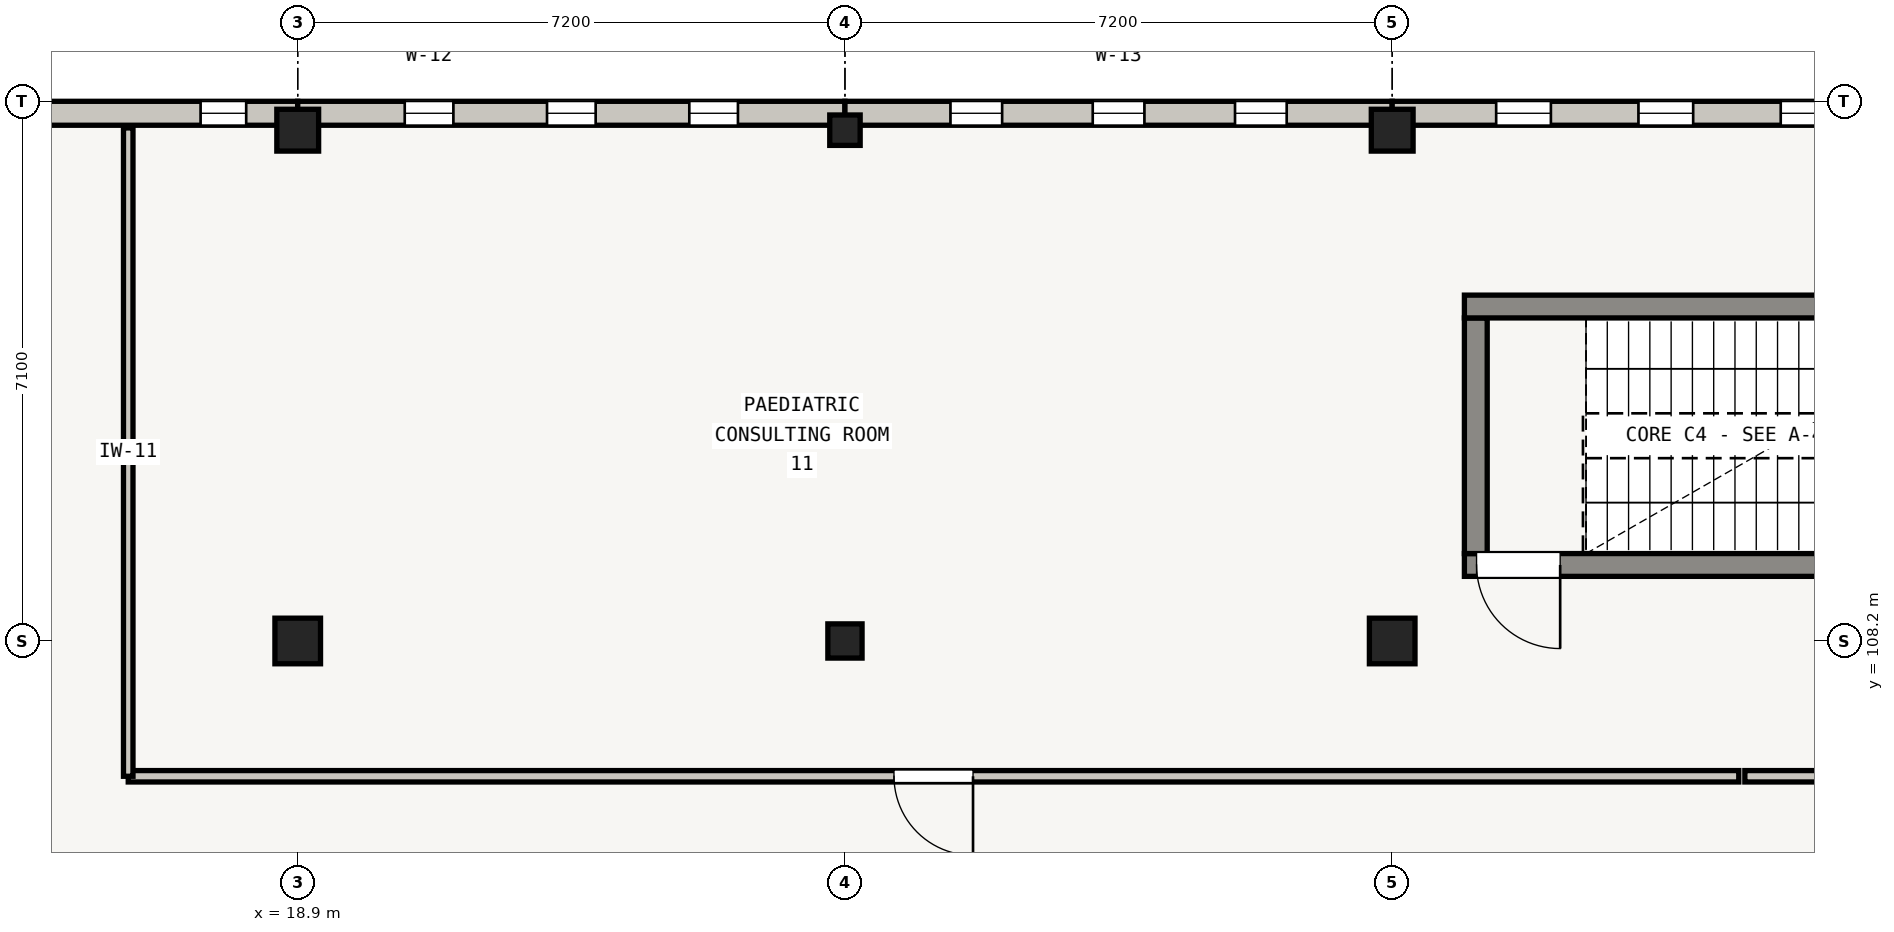
"""IFC4 building model, lengths in metres.
Left out: names, types, materials, properties, quantities, classifications, styles, units other than length and angle.
Written with IfcOpenShell. Run it as: python <this file> out.ifc"""

import sys

from ifc_helpers import new_model, si_unit, direction, frame, frame_2d, origin, origin_2d, place, context, subcontext, project, spatial, rectangle, extrude, element, fill, save


model = new_model("IFC4")
c1 = context("Model", 3, precision=1e-05, world=origin(), true_north=direction((0.0, 1.0)))
c2 = subcontext(c1, "Body", "Model", "MODEL_VIEW")
j1 = project(units=[si_unit("LENGTHUNIT", "METRE"), si_unit("PLANEANGLEUNIT", "RADIAN")], contexts=[c1])
p1 = place(None, origin())
s1 = spatial("IfcSite", under=j1, at=p1, CompositionType="ELEMENT")
p2 = place(p1, origin())
s2 = spatial("IfcBuilding", under=s1, at=p2, CompositionType="ELEMENT")
p3 = place(p2, frame((0.0, 0.0, 4.5)))
s3 = spatial("IfcBuildingStorey", under=s2, at=p3, CompositionType="ELEMENT", Elevation=4.5)
p4 = place(p3, frame((18.9, 108.2, 0.0), z_axis=(0.0, 0.0, 1.0), x_axis=(1.0, 0.0, 0.0)))
e1 = element("IfcColumn", 1, at=p4, inside=s3, PredefinedType="COLUMN", context=c2, shape_type="SweptSolid", body=[
    extrude(rectangle(XDim=0.6, YDim=0.6, at=origin_2d()), origin(), (0.0, 0.0, 1.0), 3.935),
])
p5 = place(p3, frame((18.9, 114.92, 0.0), z_axis=(0.0, 0.0, 1.0), x_axis=(1.0, 0.0, 0.0)))
e2 = element("IfcColumn", 2, at=p5, inside=s3, PredefinedType="COLUMN", context=c2, shape_type="SweptSolid", body=[
    extrude(rectangle(XDim=0.55, YDim=0.55, at=origin_2d()), origin(), (0.0, 0.0, 1.0), 3.935),
])
p6 = place(p3, frame((26.1, 108.2, 0.0), z_axis=(0.0, 0.0, 1.0), x_axis=(1.0, 0.0, 0.0)))
e3 = element("IfcColumn", 3, at=p6, inside=s3, PredefinedType="COLUMN", context=c2, shape_type="SweptSolid", body=[
    extrude(rectangle(XDim=0.45, YDim=0.45, at=origin_2d()), origin(), (0.0, 0.0, 1.0), 3.935),
])
p7 = place(p3, frame((26.1, 114.92, 0.0), z_axis=(0.0, 0.0, 1.0), x_axis=(1.0, 0.0, 0.0)))
e4 = element("IfcColumn", 4, at=p7, inside=s3, PredefinedType="COLUMN", context=c2, shape_type="SweptSolid", body=[
    extrude(rectangle(XDim=0.4, YDim=0.4, at=origin_2d()), origin(), (0.0, 0.0, 1.0), 3.935),
])
p8 = place(p3, frame((33.3, 108.2, 0.0), z_axis=(0.0, 0.0, 1.0), x_axis=(1.0, 0.0, 0.0)))
e5 = element("IfcColumn", 5, at=p8, inside=s3, PredefinedType="COLUMN", context=c2, shape_type="SweptSolid", body=[
    extrude(rectangle(XDim=0.6, YDim=0.6, at=origin_2d()), origin(), (0.0, 0.0, 1.0), 3.935),
])
p9 = place(p3, frame((33.3, 114.92, 0.0), z_axis=(0.0, 0.0, 1.0), x_axis=(1.0, 0.0, 0.0)))
e6 = element("IfcColumn", 6, at=p9, inside=s3, PredefinedType="COLUMN", context=c2, shape_type="SweptSolid", body=[
    extrude(rectangle(XDim=0.55, YDim=0.55, at=origin_2d()), origin(), (0.0, 0.0, 1.0), 3.935),
])
p10 = place(p3, frame((11.7, 115.143, 0.0), z_axis=(0.0, 0.0, 1.0), x_axis=(1.0, 0.0, 0.0)))
e7 = element("IfcWall", 7, at=p10, inside=s3, PredefinedType="SOLIDWALL", context=c2, shape_type="SweptSolid", body=[
    extrude(rectangle(XDim=7.2, YDim=0.315, at=frame_2d((3.6, 0.0))), origin(), (0.0, 0.0, 1.0), 3.3),
])
p11 = place(p10, frame((0.678, 0.0, 0.55)))
e8 = element("IfcOpeningElement", 8, at=p11, cuts=e7, PredefinedType="OPENING", context=c2, shape_type="SweptSolid", body=[
    extrude(rectangle(XDim=0.6, YDim=2.28, at=frame_2d((0.3, 1.14))), frame((0.0, 0.157, 0.0), z_axis=(0.0, -1.0, 0.0), x_axis=(1.0, 0.0, 0.0)), (0.0, 0.0, 1.0), 0.315),
])
p12 = place(p10, frame((3.3, 0.0, 0.55)))
e9 = element("IfcOpeningElement", 9, at=p12, cuts=e7, PredefinedType="OPENING", context=c2, shape_type="SweptSolid", body=[
    extrude(rectangle(XDim=0.6, YDim=2.28, at=frame_2d((0.3, 1.14))), frame((0.0, 0.157, 0.0), z_axis=(0.0, -1.0, 0.0), x_axis=(1.0, 0.0, 0.0)), (0.0, 0.0, 1.0), 0.315),
])
p13 = place(p10, frame((5.922, 0.0, 0.55)))
e10 = element("IfcOpeningElement", 10, at=p13, cuts=e7, PredefinedType="OPENING", context=c2, shape_type="SweptSolid", body=[
    extrude(rectangle(XDim=0.6, YDim=2.28, at=frame_2d((0.3, 1.14))), frame((0.0, 0.157, 0.0), z_axis=(0.0, -1.0, 0.0), x_axis=(1.0, 0.0, 0.0)), (0.0, 0.0, 1.0), 0.315),
])
p14 = place(p3, frame((18.9, 115.143, 0.0), z_axis=(0.0, 0.0, 1.0), x_axis=(1.0, 0.0, 0.0)))
e11 = element("IfcWall", 11, at=p14, inside=s3, PredefinedType="SOLIDWALL", context=c2, shape_type="SweptSolid", body=[
    extrude(rectangle(XDim=7.2, YDim=0.315, at=frame_2d((3.6, 0.0))), origin(), (0.0, 0.0, 1.0), 3.32),
])
p15 = place(p14, frame((1.408, 0.0, 0.55)))
e12 = element("IfcOpeningElement", 12, at=p15, cuts=e11, PredefinedType="OPENING", context=c2, shape_type="SweptSolid", body=[
    extrude(rectangle(XDim=0.64, YDim=2.28, at=frame_2d((0.32, 1.14))), frame((0.0, 0.157, 0.0), z_axis=(0.0, -1.0, 0.0), x_axis=(1.0, 0.0, 0.0)), (0.0, 0.0, 1.0), 0.315),
])
p16 = place(p14, frame((3.28, 0.0, 0.55)))
e13 = element("IfcOpeningElement", 13, at=p16, cuts=e11, PredefinedType="OPENING", context=c2, shape_type="SweptSolid", body=[
    extrude(rectangle(XDim=0.64, YDim=2.28, at=frame_2d((0.32, 1.14))), frame((0.0, 0.157, 0.0), z_axis=(0.0, -1.0, 0.0), x_axis=(1.0, 0.0, 0.0)), (0.0, 0.0, 1.0), 0.315),
])
p17 = place(p14, frame((5.152, 0.0, 0.55)))
e14 = element("IfcOpeningElement", 14, at=p17, cuts=e11, PredefinedType="OPENING", context=c2, shape_type="SweptSolid", body=[
    extrude(rectangle(XDim=0.64, YDim=2.28, at=frame_2d((0.32, 1.14))), frame((0.0, 0.157, 0.0), z_axis=(0.0, -1.0, 0.0), x_axis=(1.0, 0.0, 0.0)), (0.0, 0.0, 1.0), 0.315),
])
p18 = place(p3, frame((26.1, 115.143, 0.0), z_axis=(0.0, 0.0, 1.0), x_axis=(1.0, 0.0, 0.0)))
e15 = element("IfcWall", 15, at=p18, inside=s3, PredefinedType="SOLIDWALL", context=c2, shape_type="SweptSolid", body=[
    extrude(rectangle(XDim=7.2, YDim=0.315, at=frame_2d((3.6, 0.0))), origin(), (0.0, 0.0, 1.0), 3.3),
])
p19 = place(p18, frame((1.388, 0.0, 0.55)))
e16 = element("IfcOpeningElement", 16, at=p19, cuts=e15, PredefinedType="OPENING", context=c2, shape_type="SweptSolid", body=[
    extrude(rectangle(XDim=0.68, YDim=2.22, at=frame_2d((0.34, 1.11))), frame((0.0, 0.157, 0.0), z_axis=(0.0, -1.0, 0.0), x_axis=(1.0, 0.0, 0.0)), (0.0, 0.0, 1.0), 0.315),
])
p20 = place(p18, frame((3.26, 0.0, 0.55)))
e17 = element("IfcOpeningElement", 17, at=p20, cuts=e15, PredefinedType="OPENING", context=c2, shape_type="SweptSolid", body=[
    extrude(rectangle(XDim=0.68, YDim=2.22, at=frame_2d((0.34, 1.11))), frame((0.0, 0.157, 0.0), z_axis=(0.0, -1.0, 0.0), x_axis=(1.0, 0.0, 0.0)), (0.0, 0.0, 1.0), 0.315),
])
p21 = place(p18, frame((5.132, 0.0, 0.55)))
e18 = element("IfcOpeningElement", 18, at=p21, cuts=e15, PredefinedType="OPENING", context=c2, shape_type="SweptSolid", body=[
    extrude(rectangle(XDim=0.68, YDim=2.22, at=frame_2d((0.34, 1.11))), frame((0.0, 0.157, 0.0), z_axis=(0.0, -1.0, 0.0), x_axis=(1.0, 0.0, 0.0)), (0.0, 0.0, 1.0), 0.315),
])
p22 = place(p3, frame((33.3, 115.143, 0.0), z_axis=(0.0, 0.0, 1.0), x_axis=(1.0, 0.0, 0.0)))
e19 = element("IfcWall", 19, at=p22, inside=s3, PredefinedType="SOLIDWALL", context=c2, shape_type="SweptSolid", body=[
    extrude(rectangle(XDim=7.2, YDim=0.315, at=frame_2d((3.6, 0.0))), origin(), (0.0, 0.0, 1.0), 3.3),
])
p23 = place(p22, frame((1.368, 0.0, 0.55)))
e20 = element("IfcOpeningElement", 20, at=p23, cuts=e19, PredefinedType="OPENING", context=c2, shape_type="SweptSolid", body=[
    extrude(rectangle(XDim=0.72, YDim=2.22, at=frame_2d((0.36, 1.11))), frame((0.0, 0.157, 0.0), z_axis=(0.0, -1.0, 0.0), x_axis=(1.0, 0.0, 0.0)), (0.0, 0.0, 1.0), 0.315),
])
p24 = place(p22, frame((3.24, 0.0, 0.55)))
e21 = element("IfcOpeningElement", 21, at=p24, cuts=e19, PredefinedType="OPENING", context=c2, shape_type="SweptSolid", body=[
    extrude(rectangle(XDim=0.72, YDim=2.22, at=frame_2d((0.36, 1.11))), frame((0.0, 0.157, 0.0), z_axis=(0.0, -1.0, 0.0), x_axis=(1.0, 0.0, 0.0)), (0.0, 0.0, 1.0), 0.315),
])
p25 = place(p22, frame((5.112, 0.0, 0.55)))
e22 = element("IfcOpeningElement", 22, at=p25, cuts=e19, PredefinedType="OPENING", context=c2, shape_type="SweptSolid", body=[
    extrude(rectangle(XDim=0.72, YDim=2.22, at=frame_2d((0.36, 1.11))), frame((0.0, 0.157, 0.0), z_axis=(0.0, -1.0, 0.0), x_axis=(1.0, 0.0, 0.0)), (0.0, 0.0, 1.0), 0.315),
])
p26 = place(p3, frame((41.55, 109.2, 0.0), z_axis=(0.0, 0.0, 1.0), x_axis=(-1.0, 0.0, 0.0)))
e23 = element("IfcWall", 23, at=p26, inside=s3, PredefinedType="SHEAR", context=c2, shape_type="SweptSolid", body=[
    extrude(rectangle(XDim=7.3, YDim=0.3, at=frame_2d((3.65, 0.0))), origin(), (0.0, 0.0, 1.0), 3.935),
])
p27 = place(p26, frame((6.04, 0.0, 0.0)))
e24 = element("IfcOpeningElement", 24, at=p27, cuts=e23, PredefinedType="OPENING", context=c2, shape_type="SweptSolid", body=[
    extrude(rectangle(XDim=1.1, YDim=2.05, at=frame_2d((0.55, 1.025))), frame((0.0, 0.15, 0.0), z_axis=(0.0, -1.0, 0.0), x_axis=(1.0, 0.0, 0.0)), (0.0, 0.0, 1.0), 0.3),
])
p28 = place(p3, frame((34.4, 109.35, 0.0), z_axis=(0.0, 0.0, 1.0), x_axis=(0.0, 1.0, 0.0)))
e25 = element("IfcWall", 25, at=p28, inside=s3, PredefinedType="SHEAR", context=c2, shape_type="SweptSolid", body=[
    extrude(rectangle(XDim=3.1, YDim=0.3, at=frame_2d((1.55, 0.0))), origin(), (0.0, 0.0, 1.0), 3.935),
])
p29 = place(p3, frame((34.25, 112.6, 0.0), z_axis=(0.0, 0.0, 1.0), x_axis=(1.0, 0.0, 0.0)))
e26 = element("IfcWall", 26, at=p29, inside=s3, PredefinedType="SHEAR", context=c2, shape_type="SweptSolid", body=[
    extrude(rectangle(XDim=7.3, YDim=0.3, at=frame_2d((3.65, 0.0))), origin(), (0.0, 0.0, 1.0), 3.935),
])
p30 = place(p3, frame((37.86, 106.42, 0.0), z_axis=(0.0, 0.0, 1.0), x_axis=(-1.0, 0.0, 0.0)))
e27 = element("IfcWall", 27, at=p30, inside=s3, PredefinedType="PARTITIONING", context=c2, shape_type="SweptSolid", body=[
    extrude(rectangle(XDim=21.19, YDim=0.15, at=frame_2d((10.595, 0.0))), origin(), (0.0, 0.0, 1.0), 2.955),
])
p31 = place(p30, frame((10.075, 0.0, 0.0)))
e28 = element("IfcOpeningElement", 28, at=p31, cuts=e27, PredefinedType="OPENING", context=c2, shape_type="SweptSolid", body=[
    extrude(rectangle(XDim=1.04, YDim=2.05, at=frame_2d((0.52, 1.025))), frame((0.0, 0.075, 0.0), z_axis=(0.0, -1.0, 0.0), x_axis=(1.0, 0.0, 0.0)), (0.0, 0.0, 1.0), 0.15),
])
p32 = place(p3, frame((16.67, 106.42, 0.0), z_axis=(0.0, 0.0, 1.0), x_axis=(0.0, 1.0, 0.0)))
e29 = element("IfcWall", 29, at=p32, inside=s3, PredefinedType="PARTITIONING", context=c2, shape_type="SweptSolid", body=[
    extrude(rectangle(XDim=8.53, YDim=0.125, at=frame_2d((4.265, 0.0))), origin(), (0.0, 0.0, 1.0), 2.955),
])
p33 = place(p3, frame((47.35, 106.42, 0.0), z_axis=(0.0, 0.0, 1.0), x_axis=(-1.0, 0.0, 0.0)))
e30 = element("IfcWall", 30, at=p33, inside=s3, PredefinedType="PARTITIONING", context=c2, shape_type="SweptSolid", body=[
    extrude(rectangle(XDim=9.41, YDim=0.15, at=frame_2d((4.705, 0.0))), origin(), (0.0, 0.0, 1.0), 2.955),
])
p34 = place(p33, frame((4.185, 0.0, 0.0)))
e31 = element("IfcOpeningElement", 31, at=p34, cuts=e30, PredefinedType="OPENING", context=c2, shape_type="SweptSolid", body=[
    extrude(rectangle(XDim=1.04, YDim=2.05, at=frame_2d((0.52, 1.025))), frame((0.0, 0.075, 0.0), z_axis=(0.0, -1.0, 0.0), x_axis=(1.0, 0.0, 0.0)), (0.0, 0.0, 1.0), 0.15),
])
p35 = place(p13, origin())
e32 = element("IfcWindow", 32, at=p35, inside=s3, PartitioningType="SINGLE_PANEL", PredefinedType="WINDOW", context=c2, shape_type="SweptSolid", body=[
    extrude(rectangle(XDim=0.6, YDim=2.28, at=frame_2d((0.3, 1.14))), frame((0.0, 0.03, 0.0), z_axis=(0.0, -1.0, 0.0), x_axis=(1.0, 0.0, 0.0)), (0.0, 0.0, 1.0), 0.06),
])
fill(e10, e32)
p36 = place(p15, origin())
e33 = element("IfcWindow", 33, at=p36, inside=s3, PartitioningType="SINGLE_PANEL", PredefinedType="WINDOW", context=c2, shape_type="SweptSolid", body=[
    extrude(rectangle(XDim=0.64, YDim=2.28, at=frame_2d((0.32, 1.14))), frame((0.0, 0.03, 0.0), z_axis=(0.0, -1.0, 0.0), x_axis=(1.0, 0.0, 0.0)), (0.0, 0.0, 1.0), 0.06),
])
fill(e12, e33)
p37 = place(p16, origin())
e34 = element("IfcWindow", 34, at=p37, inside=s3, PartitioningType="SINGLE_PANEL", PredefinedType="WINDOW", context=c2, shape_type="SweptSolid", body=[
    extrude(rectangle(XDim=0.64, YDim=2.28, at=frame_2d((0.32, 1.14))), frame((0.0, 0.03, 0.0), z_axis=(0.0, -1.0, 0.0), x_axis=(1.0, 0.0, 0.0)), (0.0, 0.0, 1.0), 0.06),
])
fill(e13, e34)
p38 = place(p17, origin())
e35 = element("IfcWindow", 35, at=p38, inside=s3, PartitioningType="SINGLE_PANEL", PredefinedType="WINDOW", context=c2, shape_type="SweptSolid", body=[
    extrude(rectangle(XDim=0.64, YDim=2.28, at=frame_2d((0.32, 1.14))), frame((0.0, 0.03, 0.0), z_axis=(0.0, -1.0, 0.0), x_axis=(1.0, 0.0, 0.0)), (0.0, 0.0, 1.0), 0.06),
])
fill(e14, e35)
p39 = place(p19, origin())
e36 = element("IfcWindow", 36, at=p39, inside=s3, PartitioningType="SINGLE_PANEL", PredefinedType="WINDOW", context=c2, shape_type="SweptSolid", body=[
    extrude(rectangle(XDim=0.68, YDim=2.22, at=frame_2d((0.34, 1.11))), frame((0.0, 0.03, 0.0), z_axis=(0.0, -1.0, 0.0), x_axis=(1.0, 0.0, 0.0)), (0.0, 0.0, 1.0), 0.06),
])
fill(e16, e36)
p40 = place(p20, origin())
e37 = element("IfcWindow", 37, at=p40, inside=s3, PartitioningType="SINGLE_PANEL", PredefinedType="WINDOW", context=c2, shape_type="SweptSolid", body=[
    extrude(rectangle(XDim=0.68, YDim=2.22, at=frame_2d((0.34, 1.11))), frame((0.0, 0.03, 0.0), z_axis=(0.0, -1.0, 0.0), x_axis=(1.0, 0.0, 0.0)), (0.0, 0.0, 1.0), 0.06),
])
fill(e17, e37)
p41 = place(p21, origin())
e38 = element("IfcWindow", 38, at=p41, inside=s3, PartitioningType="SINGLE_PANEL", PredefinedType="WINDOW", context=c2, shape_type="SweptSolid", body=[
    extrude(rectangle(XDim=0.68, YDim=2.22, at=frame_2d((0.34, 1.11))), frame((0.0, 0.03, 0.0), z_axis=(0.0, -1.0, 0.0), x_axis=(1.0, 0.0, 0.0)), (0.0, 0.0, 1.0), 0.06),
])
fill(e18, e38)
p42 = place(p23, origin())
e39 = element("IfcWindow", 39, at=p42, inside=s3, PartitioningType="SINGLE_PANEL", PredefinedType="WINDOW", context=c2, shape_type="SweptSolid", body=[
    extrude(rectangle(XDim=0.72, YDim=2.22, at=frame_2d((0.36, 1.11))), frame((0.0, 0.03, 0.0), z_axis=(0.0, -1.0, 0.0), x_axis=(1.0, 0.0, 0.0)), (0.0, 0.0, 1.0), 0.06),
])
fill(e20, e39)
p43 = place(p24, origin())
e40 = element("IfcWindow", 40, at=p43, inside=s3, PartitioningType="SINGLE_PANEL", PredefinedType="WINDOW", context=c2, shape_type="SweptSolid", body=[
    extrude(rectangle(XDim=0.72, YDim=2.22, at=frame_2d((0.36, 1.11))), frame((0.0, 0.03, 0.0), z_axis=(0.0, -1.0, 0.0), x_axis=(1.0, 0.0, 0.0)), (0.0, 0.0, 1.0), 0.06),
])
fill(e21, e40)
p44 = place(p25, origin())
e41 = element("IfcWindow", 41, at=p44, inside=s3, PartitioningType="SINGLE_PANEL", PredefinedType="WINDOW", context=c2, shape_type="SweptSolid", body=[
    extrude(rectangle(XDim=0.72, YDim=2.22, at=frame_2d((0.36, 1.11))), frame((0.0, 0.03, 0.0), z_axis=(0.0, -1.0, 0.0), x_axis=(1.0, 0.0, 0.0)), (0.0, 0.0, 1.0), 0.06),
])
fill(e22, e41)
p45 = place(p27, origin())
e42 = element("IfcDoor", 42, at=p45, inside=s3, OperationType="SINGLE_SWING_LEFT", PredefinedType="DOOR", context=c2, shape_type="SweptSolid", body=[
    extrude(rectangle(XDim=1.1, YDim=2.05, at=frame_2d((0.55, 1.025))), frame((0.0, 0.025, 0.0), z_axis=(0.0, -1.0, 0.0), x_axis=(1.0, 0.0, 0.0)), (0.0, 0.0, 1.0), 0.05),
])
fill(e24, e42)
p46 = place(p31, origin())
e43 = element("IfcDoor", 43, at=p46, inside=s3, OperationType="SINGLE_SWING_LEFT", PredefinedType="DOOR", context=c2, shape_type="SweptSolid", body=[
    extrude(rectangle(XDim=1.04, YDim=2.05, at=frame_2d((0.52, 1.025))), frame((0.0, 0.025, 0.0), z_axis=(0.0, -1.0, 0.0), x_axis=(1.0, 0.0, 0.0)), (0.0, 0.0, 1.0), 0.05),
])
fill(e28, e43)
save(model, sys.argv[1])
